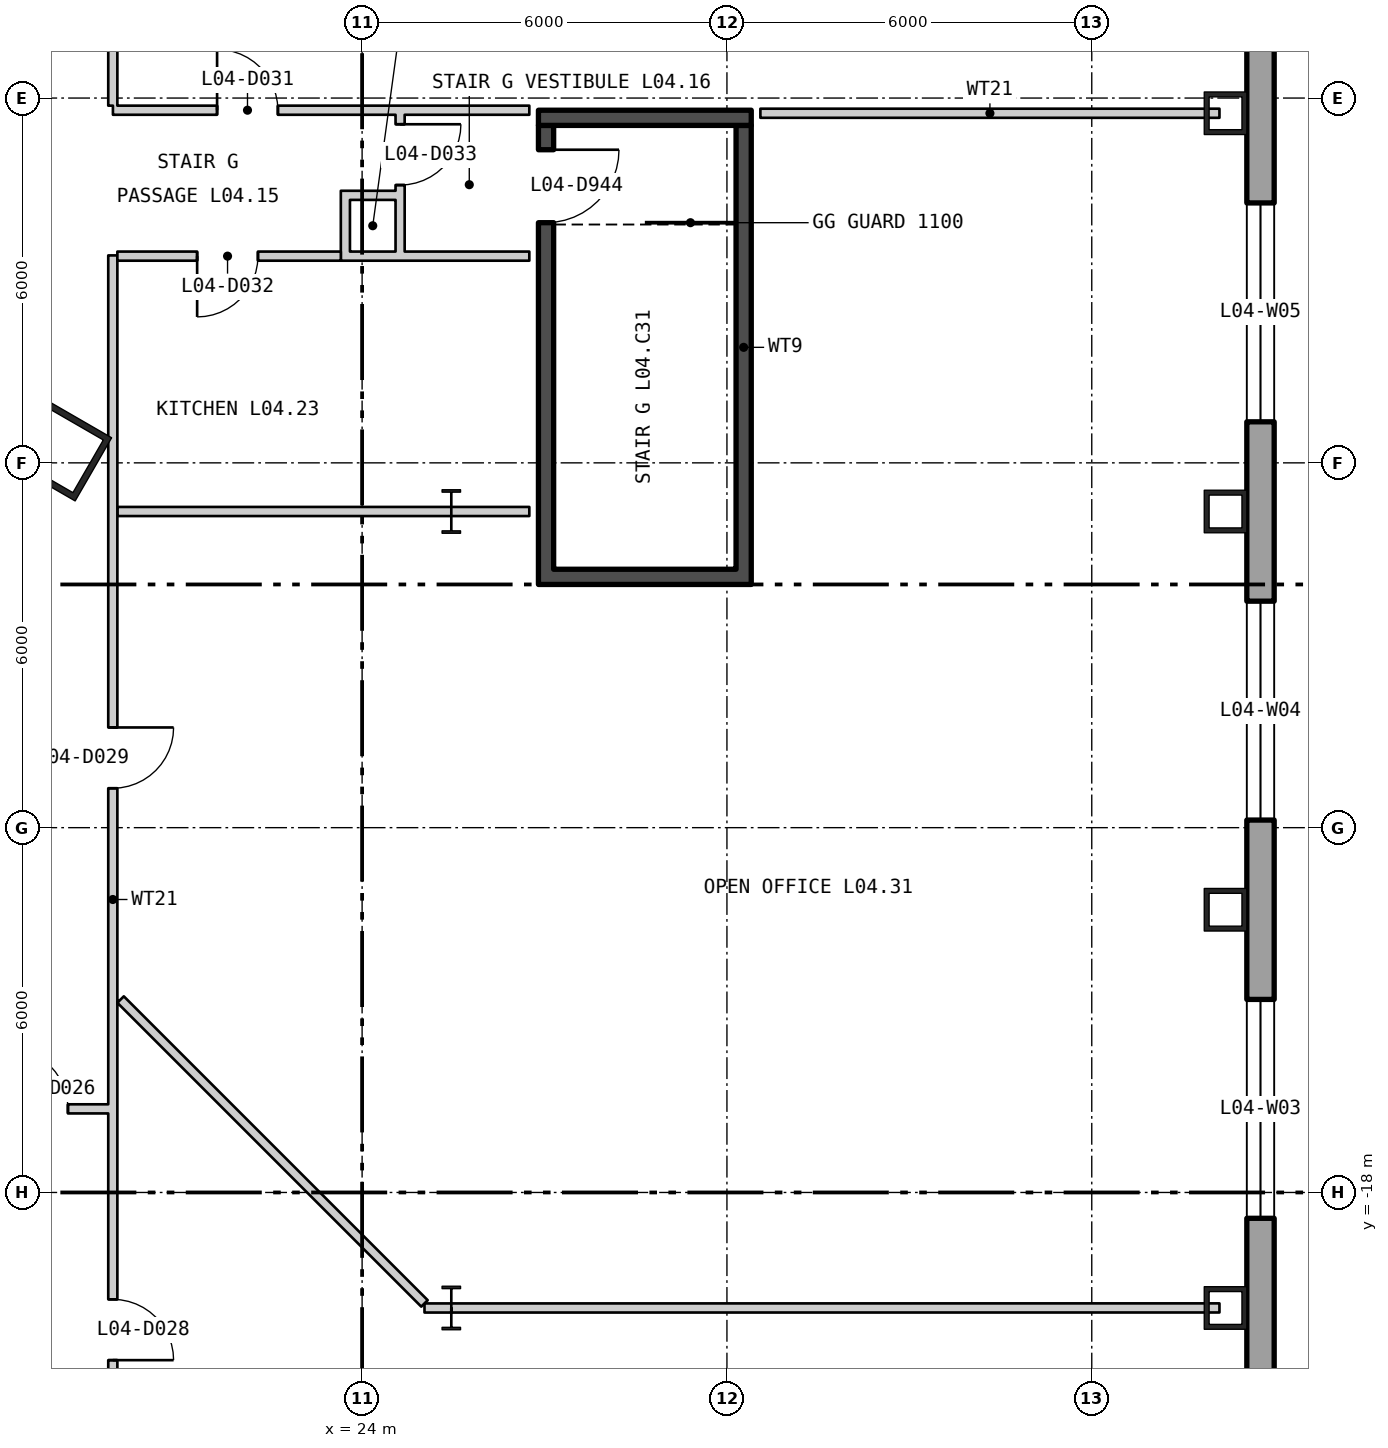
"""IFC4 building model, lengths in metres.
Left out: names, types, materials, properties, quantities, classifications, styles, units other than length and angle.
Written with IfcOpenShell. Run it as: python <this file> out.ifc"""

import sys

from ifc_helpers import new_model, si_unit, direction, frame, frame_2d, origin, origin_2d, place, context, subcontext, project, spatial, polyline, rectangle, hollow_rectangle, i_section, outline, extrude, element, fill, save


model = new_model("IFC4")
c1 = context("Model", 3, precision=1e-05, world=origin(), true_north=direction((0.0, 1.0)))
c2 = subcontext(c1, "Body", "Model", "MODEL_VIEW")
j1 = project(units=[si_unit("LENGTHUNIT", "METRE"), si_unit("PLANEANGLEUNIT", "RADIAN")], contexts=[c1])
p1 = place(None, origin())
s1 = spatial("IfcSite", under=j1, at=p1, CompositionType="ELEMENT")
p2 = place(p1, origin())
s2 = spatial("IfcBuilding", under=s1, at=p2, CompositionType="ELEMENT")
p3 = place(p2, frame((0.0, 0.0, 23.7)))
s3 = spatial("IfcBuildingStorey", under=s2, at=p3, CompositionType="ELEMENT", Elevation=23.7)
p4 = place(p3, frame((19.061, -5.807, 0.0), z_axis=(0.0, 0.0, 1.0), x_axis=(0.5, 0.866025403784, 0.0)))
e1 = element("IfcColumn", 1, at=p4, inside=s3, PredefinedType="COLUMN", context=c2, shape_type="SweptSolid", body=[
    extrude(hollow_rectangle(XDim=1.2, YDim=1.2, WallThickness=0.1, at=origin_2d()), origin(), (0.0, 0.0, 1.0), 5.1),
])
for number, where, z_axis, x_axis in (
    (2, (38.2, -19.9, 0.0), (0.0, 0.0, 1.0), (0.0, 1.0, 0.0)),
    (3, (38.2, -13.35, 0.0), (0.0, 0.0, 1.0), (0.0, 1.0, 0.0)),
    (4, (38.2, -6.8, 0.0), (0.0, 0.0, 1.0), (0.0, 1.0, 0.0)),
    (5, (38.2, -0.25, 0.0), (0.0, 0.0, 1.0), (0.0, 1.0, 0.0)),
):
    element("IfcColumn", number, at=place(p3, frame(where, z_axis=z_axis, x_axis=x_axis)), inside=s3, PredefinedType="COLUMN", context=c2, shape_type="SweptSolid", body=[
        extrude(hollow_rectangle(XDim=0.7, YDim=0.7, WallThickness=0.08, at=origin_2d()), origin(), (0.0, 0.0, 1.0), 4.85),
    ])
for number, where, z_axis, x_axis in (
    (6, (25.467, -6.8, 0.0), (0.0, 0.0, 1.0), (1.0, 0.0, 0.0)),
    (7, (25.467, -19.9, 0.0), (0.0, 0.0, 1.0), (1.0, 0.0, 0.0)),
):
    element("IfcColumn", number, at=place(p3, frame(where, z_axis=z_axis, x_axis=x_axis)), inside=s3, PredefinedType="COLUMN", context=c2, shape_type="SweptSolid", body=[
        extrude(i_section(OverallWidth=0.304, OverallDepth=0.716, WebThickness=0.021, FlangeThickness=0.04, at=origin_2d()), origin(), (0.0, 0.0, 1.0), 4.85),
    ])
p5 = place(p3, frame((38.775, -33.575, -0.4), z_axis=(0.0, 0.0, 1.0), x_axis=(0.0, 1.0, 0.0)))
e8 = element("IfcWall", 8, at=p5, inside=s3, PredefinedType="SOLIDWALL", context=c2, shape_type="SweptSolid", body=[
    extrude(outline(polyline([(-0.225, -0.225), (53.775, -0.225), (53.325, 0.225), (0.225, 0.225), (-0.225, -0.225)])), origin(), (0.0, 0.0, 1.0), 5.1),
])
p6 = place(p5, frame((2.05, 0.0, 1.3)))
e9 = element("IfcOpeningElement", 9, at=p6, cuts=e8, PredefinedType="OPENING", context=c2, shape_type="SweptSolid", body=[
    extrude(rectangle(XDim=3.6, YDim=3.2, at=frame_2d((1.8, 1.6))), frame((0.0, 0.235, 0.0), z_axis=(0.0, -1.0, 0.0), x_axis=(1.0, 0.0, 0.0)), (0.0, 0.0, 1.0), 0.47),
])
p7 = place(p5, frame((8.6, 0.0, 1.3)))
e10 = element("IfcOpeningElement", 10, at=p7, cuts=e8, PredefinedType="OPENING", context=c2, shape_type="SweptSolid", body=[
    extrude(rectangle(XDim=3.6, YDim=3.2, at=frame_2d((1.8, 1.6))), frame((0.0, 0.235, 0.0), z_axis=(0.0, -1.0, 0.0), x_axis=(1.0, 0.0, 0.0)), (0.0, 0.0, 1.0), 0.47),
])
p8 = place(p5, frame((15.15, 0.0, 1.3)))
e11 = element("IfcOpeningElement", 11, at=p8, cuts=e8, PredefinedType="OPENING", context=c2, shape_type="SweptSolid", body=[
    extrude(rectangle(XDim=3.6, YDim=3.2, at=frame_2d((1.8, 1.6))), frame((0.0, 0.235, 0.0), z_axis=(0.0, -1.0, 0.0), x_axis=(1.0, 0.0, 0.0)), (0.0, 0.0, 1.0), 0.47),
])
p9 = place(p5, frame((21.7, 0.0, 1.3)))
e12 = element("IfcOpeningElement", 12, at=p9, cuts=e8, PredefinedType="OPENING", context=c2, shape_type="SweptSolid", body=[
    extrude(rectangle(XDim=3.6, YDim=3.2, at=frame_2d((1.8, 1.6))), frame((0.0, 0.235, 0.0), z_axis=(0.0, -1.0, 0.0), x_axis=(1.0, 0.0, 0.0)), (0.0, 0.0, 1.0), 0.47),
])
p10 = place(p5, frame((28.25, 0.0, 1.3)))
e13 = element("IfcOpeningElement", 13, at=p10, cuts=e8, PredefinedType="OPENING", context=c2, shape_type="SweptSolid", body=[
    extrude(rectangle(XDim=3.6, YDim=3.2, at=frame_2d((1.8, 1.6))), frame((0.0, 0.235, 0.0), z_axis=(0.0, -1.0, 0.0), x_axis=(1.0, 0.0, 0.0)), (0.0, 0.0, 1.0), 0.47),
])
p11 = place(p5, frame((34.8, 0.0, 1.3)))
e14 = element("IfcOpeningElement", 14, at=p11, cuts=e8, PredefinedType="OPENING", context=c2, shape_type="SweptSolid", body=[
    extrude(rectangle(XDim=3.6, YDim=3.2, at=frame_2d((1.8, 1.6))), frame((0.0, 0.235, 0.0), z_axis=(0.0, -1.0, 0.0), x_axis=(1.0, 0.0, 0.0)), (0.0, 0.0, 1.0), 0.47),
])
p12 = place(p5, frame((41.35, 0.0, 1.3)))
e15 = element("IfcOpeningElement", 15, at=p12, cuts=e8, PredefinedType="OPENING", context=c2, shape_type="SweptSolid", body=[
    extrude(rectangle(XDim=3.6, YDim=3.2, at=frame_2d((1.8, 1.6))), frame((0.0, 0.235, 0.0), z_axis=(0.0, -1.0, 0.0), x_axis=(1.0, 0.0, 0.0)), (0.0, 0.0, 1.0), 0.47),
])
p13 = place(p5, frame((47.9, 0.0, 1.3)))
e16 = element("IfcOpeningElement", 16, at=p13, cuts=e8, PredefinedType="OPENING", context=c2, shape_type="SweptSolid", body=[
    extrude(rectangle(XDim=3.6, YDim=3.2, at=frame_2d((1.8, 1.6))), frame((0.0, 0.235, 0.0), z_axis=(0.0, -1.0, 0.0), x_axis=(1.0, 0.0, 0.0)), (0.0, 0.0, 1.0), 0.47),
])
p14 = place(p3, frame((27.025, -7.75, 0.0), z_axis=(0.0, 0.0, 1.0), x_axis=(0.0, 1.0, 0.0)))
e17 = element("IfcWall", 17, at=p14, inside=s3, PredefinedType="SHEAR", context=c2, shape_type="SweptSolid", body=[
    extrude(rectangle(XDim=7.3, YDim=0.25, at=frame_2d((3.65, 0.0))), origin(), (0.0, 0.0, 1.0), 4.85),
])
p15 = place(p14, frame((5.7, 0.0, 0.0)))
e18 = element("IfcOpeningElement", 18, at=p15, cuts=e17, PredefinedType="OPENING", context=c2, shape_type="SweptSolid", body=[
    extrude(rectangle(XDim=1.2, YDim=2.1, at=frame_2d((0.6, 1.05))), frame((0.0, 0.135, 0.0), z_axis=(0.0, -1.0, 0.0), x_axis=(1.0, 0.0, 0.0)), (0.0, 0.0, 1.0), 0.27),
])
p16 = place(p3, frame((30.275, -7.75, 0.0), z_axis=(0.0, 0.0, 1.0), x_axis=(0.0, 1.0, 0.0)))
e19 = element("IfcWall", 19, at=p16, inside=s3, PredefinedType="SHEAR", context=c2, shape_type="SweptSolid", body=[
    extrude(rectangle(XDim=7.3, YDim=0.25, at=frame_2d((3.65, 0.0))), origin(), (0.0, 0.0, 1.0), 4.85),
])
for number, where, z_axis, x_axis in (
    (20, (26.9, -7.875, 0.0), (0.0, 0.0, 1.0), (1.0, 0.0, 0.0)),
    (21, (26.9, -0.325, 0.0), (0.0, 0.0, 1.0), (1.0, 0.0, 0.0)),
):
    element("IfcWall", number, at=place(p3, frame(where, z_axis=z_axis, x_axis=x_axis)), inside=s3, PredefinedType="SHEAR", context=c2, shape_type="SweptSolid", body=[
        extrude(rectangle(XDim=3.5, YDim=0.25, at=frame_2d((1.75, 0.0))), origin(), (0.0, 0.0, 1.0), 4.85),
    ])
p17 = place(p3, frame((17.5, -16.625, 0.0), z_axis=(0.0, 0.0, 1.0), x_axis=(1.0, 0.0, 0.0)))
e22 = element("IfcWall", 22, at=p17, inside=s3, PredefinedType="PARTITIONING", context=c2, shape_type="SweptSolid", body=[
    extrude(rectangle(XDim=2.325, YDim=0.15, at=frame_2d((1.163, 0.0))), origin(), (0.0, 0.0, 1.0), 4.85),
])
p18 = place(p17, frame((0.662, 0.0, 0.0)))
e23 = element("IfcOpeningElement", 23, at=p18, cuts=e22, PredefinedType="OPENING", context=c2, shape_type="SweptSolid", body=[
    extrude(rectangle(XDim=1.0, YDim=2.1, at=frame_2d((0.5, 1.05))), frame((0.0, 0.085, 0.0), z_axis=(0.0, -1.0, 0.0), x_axis=(1.0, 0.0, 0.0)), (0.0, 0.0, 1.0), 0.17),
])
p19 = place(p3, frame((19.9, -23.775, 0.0), z_axis=(0.0, 0.0, 1.0), x_axis=(0.0, 1.0, 0.0)))
e24 = element("IfcWall", 24, at=p19, inside=s3, PredefinedType="PARTITIONING", context=c2, shape_type="SweptSolid", body=[
    extrude(rectangle(XDim=21.187, YDim=0.15, at=frame_2d((10.594, 0.0))), origin(), (0.0, 0.0, 1.0), 4.85),
])
p20 = place(p19, frame((3.017, 0.0, 0.0)))
e25 = element("IfcOpeningElement", 25, at=p20, cuts=e24, PredefinedType="OPENING", context=c2, shape_type="SweptSolid", body=[
    extrude(rectangle(XDim=1.0, YDim=2.1, at=frame_2d((0.5, 1.05))), frame((0.0, 0.085, 0.0), z_axis=(0.0, -1.0, 0.0), x_axis=(1.0, 0.0, 0.0)), (0.0, 0.0, 1.0), 0.17),
])
p21 = place(p19, frame((12.423, 0.0, 0.0)))
e26 = element("IfcOpeningElement", 26, at=p21, cuts=e24, PredefinedType="OPENING", context=c2, shape_type="SweptSolid", body=[
    extrude(rectangle(XDim=1.0, YDim=2.1, at=frame_2d((0.5, 1.05))), frame((0.0, 0.085, 0.0), z_axis=(0.0, -1.0, 0.0), x_axis=(1.0, 0.0, 0.0)), (0.0, 0.0, 1.0), 0.17),
])
p22 = place(p3, frame((19.9, -0.125, 0.0), z_axis=(0.0, 0.0, 1.0), x_axis=(0.0, 1.0, 0.0)))
e27 = element("IfcWall", 27, at=p22, inside=s3, PredefinedType="PARTITIONING", context=c2, shape_type="SweptSolid", body=[
    extrude(rectangle(XDim=1.15, YDim=0.15, at=frame_2d((0.575, 0.0))), origin(), (0.0, 0.0, 1.0), 4.85),
])
p23 = place(p3, frame((19.902, -0.2, 0.0), z_axis=(0.0, 0.0, 1.0), x_axis=(1.0, 0.0, 0.0)))
e28 = element("IfcWall", 28, at=p23, inside=s3, PredefinedType="PARTITIONING", context=c2, shape_type="SweptSolid", body=[
    extrude(rectangle(XDim=6.848, YDim=0.15, at=frame_2d((3.424, 0.0))), origin(), (0.0, 0.0, 1.0), 4.85),
])
p24 = place(p23, frame((1.713, 0.0, 0.0)))
e29 = element("IfcOpeningElement", 29, at=p24, cuts=e28, PredefinedType="OPENING", context=c2, shape_type="SweptSolid", body=[
    extrude(rectangle(XDim=1.0, YDim=2.1, at=frame_2d((0.5, 1.05))), frame((0.0, 0.085, 0.0), z_axis=(0.0, -1.0, 0.0), x_axis=(1.0, 0.0, 0.0)), (0.0, 0.0, 1.0), 0.17),
])
p25 = place(p3, frame((19.975, -6.8, 0.0), z_axis=(0.0, 0.0, 1.0), x_axis=(1.0, 0.0, 0.0)))
e30 = element("IfcWall", 30, at=p25, inside=s3, PredefinedType="PARTITIONING", context=c2, shape_type="SweptSolid", body=[
    extrude(rectangle(XDim=5.492, YDim=0.15, at=frame_2d((2.746, 0.0))), origin(), (0.0, 0.0, 1.0), 4.16),
])
p26 = place(p3, frame((25.467, -6.8, 0.0), z_axis=(0.0, 0.0, 1.0), x_axis=(1.0, 0.0, 0.0)))
e31 = element("IfcWall", 31, at=p26, inside=s3, PredefinedType="PARTITIONING", context=c2, shape_type="SweptSolid", body=[
    extrude(rectangle(XDim=1.283, YDim=0.15, at=frame_2d((0.641, 0.0))), origin(), (0.0, 0.0, 1.0), 4.06),
])
p27 = place(p3, frame((19.975, -2.6, 0.0), z_axis=(0.0, 0.0, 1.0), x_axis=(1.0, 0.0, 0.0)))
e32 = element("IfcWall", 32, at=p27, inside=s3, PredefinedType="PARTITIONING", context=c2, shape_type="SweptSolid", body=[
    extrude(rectangle(XDim=3.675, YDim=0.15, at=frame_2d((1.837, 0.0))), origin(), (0.0, 0.0, 1.0), 4.85),
])
p28 = place(p27, frame((1.312, 0.0, 0.0)))
e33 = element("IfcOpeningElement", 33, at=p28, cuts=e32, PredefinedType="OPENING", context=c2, shape_type="SweptSolid", body=[
    extrude(rectangle(XDim=1.0, YDim=2.1, at=frame_2d((0.5, 1.05))), frame((0.0, 0.085, 0.0), z_axis=(0.0, -1.0, 0.0), x_axis=(1.0, 0.0, 0.0)), (0.0, 0.0, 1.0), 0.17),
])
p29 = place(p3, frame((20.028, -14.827, 0.0), z_axis=(0.0, 0.0, 1.0), x_axis=(0.707106781187, -0.707106781187, 0.0)))
e34 = element("IfcWall", 34, at=p29, inside=s3, PredefinedType="PARTITIONING", context=c2, shape_type="SweptSolid", body=[
    extrude(rectangle(XDim=7.068, YDim=0.15, at=frame_2d((3.534, 0.0))), origin(), (0.0, 0.0, 1.0), 4.85),
])
p30 = place(p3, frame((23.725, -2.675, 0.0), z_axis=(0.0, 0.0, 1.0), x_axis=(0.0, 1.0, 0.0)))
e35 = element("IfcWall", 35, at=p30, inside=s3, PredefinedType="PARTITIONING", context=c2, shape_type="SweptSolid", body=[
    extrude(rectangle(XDim=1.15, YDim=0.15, at=frame_2d((0.575, 0.0))), origin(), (0.0, 0.0, 1.0), 4.85),
])
for number, where, z_axis, x_axis in (
    (36, (23.8, -2.6, 0.0), (0.0, 0.0, 1.0), (1.0, 0.0, 0.0)),
    (37, (23.8, -1.6, 0.0), (0.0, 0.0, 1.0), (1.0, 0.0, 0.0)),
):
    element("IfcWall", number, at=place(p3, frame(where, z_axis=z_axis, x_axis=x_axis)), inside=s3, PredefinedType="PARTITIONING", context=c2, shape_type="SweptSolid", body=[
        extrude(rectangle(XDim=0.75, YDim=0.15, at=frame_2d((0.375, 0.0))), origin(), (0.0, 0.0, 1.0), 4.85),
    ])
p31 = place(p3, frame((24.625, -2.675, 0.0), z_axis=(0.0, 0.0, 1.0), x_axis=(0.0, 1.0, 0.0)))
e38 = element("IfcWall", 38, at=p31, inside=s3, PredefinedType="PARTITIONING", context=c2, shape_type="SweptSolid", body=[
    extrude(rectangle(XDim=1.087, YDim=0.15, at=frame_2d((0.543, 0.0))), origin(), (0.0, 0.0, 1.0), 4.85),
])
p32 = place(p3, frame((24.625, -1.588, 0.0), z_axis=(0.0, 0.0, 1.0), x_axis=(0.0, 1.0, 0.0)))
e39 = element("IfcWall", 39, at=p32, inside=s3, PredefinedType="PARTITIONING", context=c2, shape_type="SweptSolid", body=[
    extrude(rectangle(XDim=1.313, YDim=0.15, at=frame_2d((0.656, 0.0))), origin(), (0.0, 0.0, 1.0), 4.85),
])
p33 = place(p32, frame((0.157, 0.0, 0.0)))
e40 = element("IfcOpeningElement", 40, at=p33, cuts=e39, PredefinedType="OPENING", context=c2, shape_type="SweptSolid", body=[
    extrude(rectangle(XDim=1.0, YDim=2.1, at=frame_2d((0.5, 1.05))), frame((0.0, 0.085, 0.0), z_axis=(0.0, -1.0, 0.0), x_axis=(1.0, 0.0, 0.0)), (0.0, 0.0, 1.0), 0.17),
])
p34 = place(p3, frame((24.7, -2.6, 0.0), z_axis=(0.0, 0.0, 1.0), x_axis=(1.0, 0.0, 0.0)))
e41 = element("IfcWall", 41, at=p34, inside=s3, PredefinedType="PARTITIONING", context=c2, shape_type="SweptSolid", body=[
    extrude(rectangle(XDim=2.05, YDim=0.15, at=frame_2d((1.025, 0.0))), origin(), (0.0, 0.0, 1.0), 4.85),
])
p35 = place(p3, frame((25.026, -19.9, 0.0), z_axis=(0.0, 0.0, 1.0), x_axis=(1.0, 0.0, 0.0)))
e42 = element("IfcWall", 42, at=p35, inside=s3, PredefinedType="PARTITIONING", context=c2, shape_type="SweptSolid", body=[
    extrude(rectangle(XDim=0.441, YDim=0.15, at=frame_2d((0.221, 0.0))), origin(), (0.0, 0.0, 1.0), 4.85),
])
p36 = place(p3, frame((25.467, -19.9, 0.0), z_axis=(0.0, 0.0, 1.0), x_axis=(0.999999996867, 7.9157761e-05, 0.0)))
e43 = element("IfcWall", 43, at=p36, inside=s3, PredefinedType="PARTITIONING", context=c2, shape_type="SweptSolid", body=[
    extrude(rectangle(XDim=12.633, YDim=0.15, at=frame_2d((6.316, 0.0))), origin(), (0.0, 0.0, 1.0), 4.06),
])
p37 = place(p3, frame((30.55, -0.25, 0.0), z_axis=(0.0, 0.0, 1.0), x_axis=(1.0, 0.0, 0.0)))
e44 = element("IfcWall", 44, at=p37, inside=s3, PredefinedType="PARTITIONING", context=c2, shape_type="SweptSolid", body=[
    extrude(rectangle(XDim=7.55, YDim=0.15, at=frame_2d((3.775, 0.0))), origin(), (0.0, 0.0, 1.0), 4.85),
])
p38 = place(p8, origin())
e45 = element("IfcWindow", 45, at=p38, inside=s3, PartitioningType="SINGLE_PANEL", PredefinedType="WINDOW", context=c2, shape_type="SweptSolid", body=[
    extrude(rectangle(XDim=3.6, YDim=3.2, at=frame_2d((1.8, 1.6))), frame((0.0, 0.105, 0.0), z_axis=(0.0, -1.0, 0.0), x_axis=(1.0, 0.0, 0.0)), (0.0, 0.0, 1.0), 0.06),
])
fill(e11, e45)
p39 = place(p9, origin())
e46 = element("IfcWindow", 46, at=p39, inside=s3, PartitioningType="SINGLE_PANEL", PredefinedType="WINDOW", context=c2, shape_type="SweptSolid", body=[
    extrude(rectangle(XDim=3.6, YDim=3.2, at=frame_2d((1.8, 1.6))), frame((0.0, 0.105, 0.0), z_axis=(0.0, -1.0, 0.0), x_axis=(1.0, 0.0, 0.0)), (0.0, 0.0, 1.0), 0.06),
])
fill(e12, e46)
p40 = place(p10, origin())
e47 = element("IfcWindow", 47, at=p40, inside=s3, PartitioningType="SINGLE_PANEL", PredefinedType="WINDOW", context=c2, shape_type="SweptSolid", body=[
    extrude(rectangle(XDim=3.6, YDim=3.2, at=frame_2d((1.8, 1.6))), frame((0.0, 0.105, 0.0), z_axis=(0.0, -1.0, 0.0), x_axis=(1.0, 0.0, 0.0)), (0.0, 0.0, 1.0), 0.06),
])
fill(e13, e47)
p41 = place(p15, origin())
e48 = element("IfcDoor", 48, at=p41, inside=s3, OperationType="SINGLE_SWING_RIGHT", PredefinedType="DOOR", context=c2, shape_type="SweptSolid", body=[
    extrude(rectangle(XDim=1.2, YDim=2.1, at=frame_2d((0.6, 1.05))), frame((0.0, 0.025, 0.0), z_axis=(0.0, -1.0, 0.0), x_axis=(1.0, 0.0, 0.0)), (0.0, 0.0, 1.0), 0.05),
])
fill(e18, e48)
p42 = place(p18, origin())
e49 = element("IfcDoor", 49, at=p42, inside=s3, OperationType="SINGLE_SWING_RIGHT", PredefinedType="DOOR", context=c2, shape_type="SweptSolid", body=[
    extrude(rectangle(XDim=1.0, YDim=2.1, at=frame_2d((0.5, 1.05))), frame((0.0, 0.025, 0.0), z_axis=(0.0, -1.0, 0.0), x_axis=(1.0, 0.0, 0.0)), (0.0, 0.0, 1.0), 0.05),
])
fill(e23, e49)
p43 = place(p20, origin())
e50 = element("IfcDoor", 50, at=p43, inside=s3, OperationType="SINGLE_SWING_LEFT", PredefinedType="DOOR", context=c2, shape_type="SweptSolid", body=[
    extrude(rectangle(XDim=1.0, YDim=2.1, at=frame_2d((0.5, 1.05))), frame((0.0, 0.025, 0.0), z_axis=(0.0, -1.0, 0.0), x_axis=(1.0, 0.0, 0.0)), (0.0, 0.0, 1.0), 0.05),
])
fill(e25, e50)
p44 = place(p21, origin())
e51 = element("IfcDoor", 51, at=p44, inside=s3, OperationType="SINGLE_SWING_RIGHT", PredefinedType="DOOR", context=c2, shape_type="SweptSolid", body=[
    extrude(rectangle(XDim=1.0, YDim=2.1, at=frame_2d((0.5, 1.05))), frame((0.0, 0.025, 0.0), z_axis=(0.0, -1.0, 0.0), x_axis=(1.0, 0.0, 0.0)), (0.0, 0.0, 1.0), 0.05),
])
fill(e26, e51)
p45 = place(p24, origin())
e52 = element("IfcDoor", 52, at=p45, inside=s3, OperationType="SINGLE_SWING_RIGHT", PredefinedType="DOOR", context=c2, shape_type="SweptSolid", body=[
    extrude(rectangle(XDim=1.0, YDim=2.1, at=frame_2d((0.5, 1.05))), frame((0.0, 0.025, 0.0), z_axis=(0.0, -1.0, 0.0), x_axis=(1.0, 0.0, 0.0)), (0.0, 0.0, 1.0), 0.05),
])
fill(e29, e52)
p46 = place(p28, origin())
e53 = element("IfcDoor", 53, at=p46, inside=s3, OperationType="SINGLE_SWING_LEFT", PredefinedType="DOOR", context=c2, shape_type="SweptSolid", body=[
    extrude(rectangle(XDim=1.0, YDim=2.1, at=frame_2d((0.5, 1.05))), frame((0.0, 0.025, 0.0), z_axis=(0.0, -1.0, 0.0), x_axis=(1.0, 0.0, 0.0)), (0.0, 0.0, 1.0), 0.05),
])
fill(e33, e53)
p47 = place(p33, origin())
e54 = element("IfcDoor", 54, at=p47, inside=s3, OperationType="SINGLE_SWING_RIGHT", PredefinedType="DOOR", context=c2, shape_type="SweptSolid", body=[
    extrude(rectangle(XDim=1.0, YDim=2.1, at=frame_2d((0.5, 1.05))), frame((0.0, 0.025, 0.0), z_axis=(0.0, -1.0, 0.0), x_axis=(1.0, 0.0, 0.0)), (0.0, 0.0, 1.0), 0.05),
])
fill(e40, e54)
save(model, sys.argv[1])
